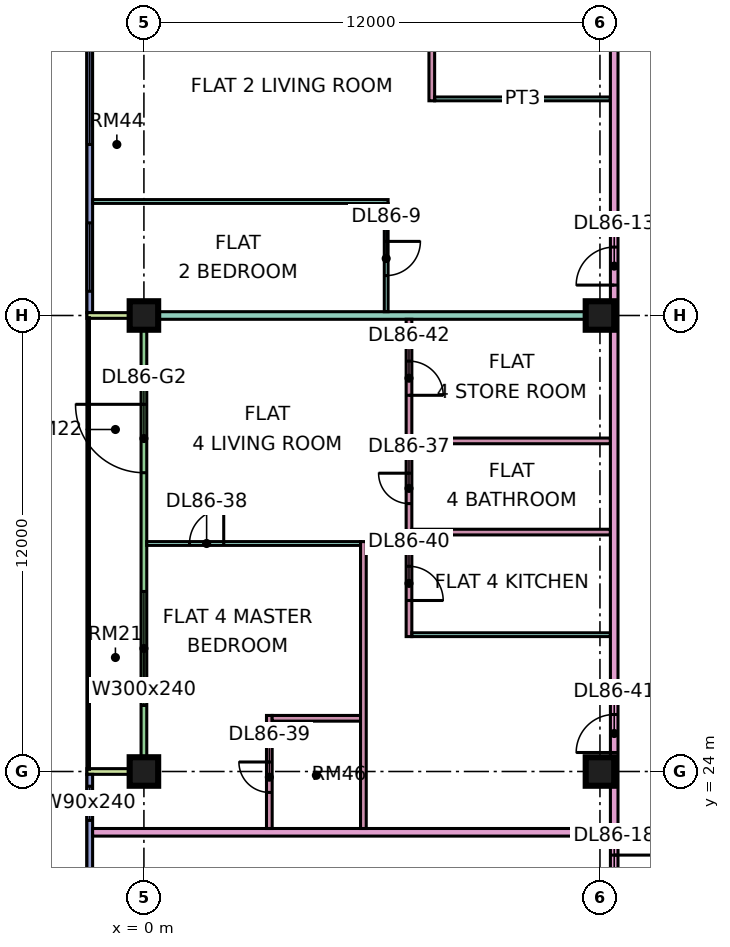
"""IFC4 building model, lengths in metres.
Left out: names, types, materials, properties, quantities, classifications, styles, units other than length and angle.
Written with IfcOpenShell. Run it as: python <this file> out.ifc"""

import sys

from ifc_helpers import new_model, si_unit, direction, frame, frame_2d, origin, origin_2d, place, context, subcontext, project, spatial, rectangle, extrude, element, fill, save


model = new_model("IFC4")
c1 = context("Model", 3, precision=1e-05, world=origin(), true_north=direction((0.0, 1.0)))
c2 = subcontext(c1, "Body", "Model", "MODEL_VIEW")
j1 = project(units=[si_unit("LENGTHUNIT", "METRE"), si_unit("PLANEANGLEUNIT", "RADIAN")], contexts=[c1])
p1 = place(None, origin())
s1 = spatial("IfcSite", under=j1, at=p1, CompositionType="ELEMENT")
p2 = place(p1, origin())
s2 = spatial("IfcBuilding", under=s1, at=p2, CompositionType="ELEMENT")
p3 = place(p2, frame((0.0, 0.0, 368.9)))
s3 = spatial("IfcBuildingStorey", under=s2, at=p3, CompositionType="ELEMENT", Elevation=368.9)
p4 = place(p3, frame((0.0, 24.0, 0.0), z_axis=(0.0, 0.0, 1.0), x_axis=(1.0, 0.0, 0.0)))
e1 = element("IfcColumn", 1, at=p4, inside=s3, PredefinedType="COLUMN", context=c2, shape_type="SweptSolid", body=[
    extrude(rectangle(XDim=0.75, YDim=0.75, at=origin_2d()), origin(), (0.0, 0.0, 1.0), 3.75),
])
p5 = place(p3, frame((0.0, 36.0, 0.0), z_axis=(0.0, 0.0, 1.0), x_axis=(1.0, 0.0, 0.0)))
e2 = element("IfcColumn", 2, at=p5, inside=s3, PredefinedType="COLUMN", context=c2, shape_type="SweptSolid", body=[
    extrude(rectangle(XDim=0.75, YDim=0.75, at=origin_2d()), origin(), (0.0, 0.0, 1.0), 3.75),
])
for number, where, z_axis, x_axis in (
    (3, (12.0, 24.0, 0.0), (0.0, 0.0, 1.0), (1.0, 0.0, 0.0)),
    (4, (12.0, 36.0, 0.0), (0.0, 0.0, 1.0), (1.0, 0.0, 0.0)),
):
    element("IfcColumn", number, at=place(p3, frame(where, z_axis=z_axis, x_axis=x_axis)), inside=s3, PredefinedType="COLUMN", context=c2, shape_type="SweptSolid", body=[
        extrude(rectangle(XDim=0.75, YDim=0.75, at=origin_2d()), origin(), (0.0, 0.0, 1.0), 3.75),
    ])
p6 = place(p3, frame((-1.425, 47.925, 0.0), z_axis=(0.0, 0.0, 1.0), x_axis=(0.0, -1.0, 0.0)))
e5 = element("IfcWall", 5, at=p6, inside=s3, PredefinedType="SOLIDWALL", context=c2, shape_type="SweptSolid", body=[
    extrude(rectangle(XDim=11.85, YDim=0.15, at=frame_2d((5.925, 0.0))), origin(), (0.0, 0.0, 1.0), 3.35),
])
p7 = place(p6, frame((0.562, 0.0, 0.45)))
e6 = element("IfcOpeningElement", 6, at=p7, cuts=e5, PredefinedType="OPENING", context=c2, shape_type="SweptSolid", body=[
    extrude(rectangle(XDim=1.8, YDim=2.4, at=frame_2d((0.9, 1.2))), frame((0.0, 0.085, 0.0), z_axis=(0.0, -1.0, 0.0), x_axis=(1.0, 0.0, 0.0)), (0.0, 0.0, 1.0), 0.17),
])
p8 = place(p6, frame((4.425, 0.0, 0.45)))
e7 = element("IfcOpeningElement", 7, at=p8, cuts=e5, PredefinedType="OPENING", context=c2, shape_type="SweptSolid", body=[
    extrude(rectangle(XDim=3.0, YDim=2.4, at=frame_2d((1.5, 1.2))), frame((0.0, 0.085, 0.0), z_axis=(0.0, -1.0, 0.0), x_axis=(1.0, 0.0, 0.0)), (0.0, 0.0, 1.0), 0.17),
])
p9 = place(p6, frame((9.488, 0.0, 0.45)))
e8 = element("IfcOpeningElement", 8, at=p9, cuts=e5, PredefinedType="OPENING", context=c2, shape_type="SweptSolid", body=[
    extrude(rectangle(XDim=1.8, YDim=2.4, at=frame_2d((0.9, 1.2))), frame((0.0, 0.085, 0.0), z_axis=(0.0, -1.0, 0.0), x_axis=(1.0, 0.0, 0.0)), (0.0, 0.0, 1.0), 0.17),
])
p10 = place(p3, frame((0.0, 35.925, 0.0), z_axis=(0.0, 0.0, 1.0), x_axis=(0.0, -1.0, 0.0)))
e9 = element("IfcWall", 9, at=p10, inside=s3, PredefinedType="SOLIDWALL", context=c2, shape_type="SweptSolid", body=[
    extrude(rectangle(XDim=11.85, YDim=0.15, at=frame_2d((5.925, 0.0))), origin(), (0.0, 0.0, 1.0), 3.35),
])
p11 = place(p10, frame((2.262, 0.0, 0.0)))
e10 = element("IfcOpeningElement", 10, at=p11, cuts=e9, PredefinedType="OPENING", context=c2, shape_type="SweptSolid", body=[
    extrude(rectangle(XDim=1.8, YDim=2.4, at=frame_2d((0.9, 1.2))), frame((0.0, 0.085, 0.0), z_axis=(0.0, -1.0, 0.0), x_axis=(1.0, 0.0, 0.0)), (0.0, 0.0, 1.0), 0.17),
])
p12 = place(p10, frame((7.188, 0.0, 0.45)))
e11 = element("IfcOpeningElement", 11, at=p12, cuts=e9, PredefinedType="OPENING", context=c2, shape_type="SweptSolid", body=[
    extrude(rectangle(XDim=3.0, YDim=2.4, at=frame_2d((1.5, 1.2))), frame((0.0, 0.085, 0.0), z_axis=(0.0, -1.0, 0.0), x_axis=(1.0, 0.0, 0.0)), (0.0, 0.0, 1.0), 0.17),
])
for number, where, z_axis, x_axis in (
    (12, (-1.5, 36.0, 0.0), (0.0, 0.0, 1.0), (1.0, 0.0, 0.0)),
    (13, (-1.5, 24.0, 0.0), (0.0, 0.0, 1.0), (1.0, 0.0, 0.0)),
):
    element("IfcWall", number, at=place(p3, frame(where, z_axis=z_axis, x_axis=x_axis)), inside=s3, PredefinedType="SOLIDWALL", context=c2, shape_type="SweptSolid", body=[
        extrude(rectangle(XDim=1.5, YDim=0.15, at=frame_2d((0.75, 0.0))), origin(), (0.0, 0.0, 1.0), 3.35),
    ])
p13 = place(p3, frame((-1.425, 23.925, 0.0), z_axis=(0.0, 0.0, 1.0), x_axis=(0.0, -1.0, 0.0)))
e14 = element("IfcWall", 14, at=p13, inside=s3, PredefinedType="SOLIDWALL", context=c2, shape_type="SweptSolid", body=[
    extrude(rectangle(XDim=11.425, YDim=0.15, at=frame_2d((5.712, 0.0))), origin(), (0.0, 0.0, 1.0), 3.35),
])
p14 = place(p13, frame((0.312, 0.0, 0.45)))
e15 = element("IfcOpeningElement", 15, at=p14, cuts=e14, PredefinedType="OPENING", context=c2, shape_type="SweptSolid", body=[
    extrude(rectangle(XDim=0.9, YDim=2.4, at=frame_2d((0.45, 1.2))), frame((0.0, 0.085, 0.0), z_axis=(0.0, -1.0, 0.0), x_axis=(1.0, 0.0, 0.0)), (0.0, 0.0, 1.0), 0.17),
])
p15 = place(p13, frame((6.175, 0.0, 0.45)))
e16 = element("IfcOpeningElement", 16, at=p15, cuts=e14, PredefinedType="OPENING", context=c2, shape_type="SweptSolid", body=[
    extrude(rectangle(XDim=3.0, YDim=2.4, at=frame_2d((1.5, 1.2))), frame((0.0, 0.085, 0.0), z_axis=(0.0, -1.0, 0.0), x_axis=(1.0, 0.0, 0.0)), (0.0, 0.0, 1.0), 0.17),
])
p16 = place(p3, frame((-1.35, 22.4, 0.0), z_axis=(0.0, 0.0, 1.0), x_axis=(1.0, 0.0, 0.0)))
e17 = element("IfcWall", 17, at=p16, inside=s3, PredefinedType="PARTITIONING", context=c2, shape_type="SweptSolid", body=[
    extrude(rectangle(XDim=13.625, YDim=0.2, at=frame_2d((6.812, 0.0))), origin(), (0.0, 0.0, 1.0), 3.35),
])
e18 = element("IfcWall", 18, at=p5, inside=s3, PredefinedType="PARTITIONING", context=c2, shape_type="SweptSolid", body=[
    extrude(rectangle(XDim=12.275, YDim=0.2, at=frame_2d((6.137, 0.0))), origin(), (0.0, 0.0, 1.0), 3.35),
])
p17 = place(p3, frame((-1.35, 39.0, 0.0), z_axis=(0.0, 0.0, 1.0), x_axis=(1.0, 0.0, 0.0)))
e19 = element("IfcWall", 19, at=p17, inside=s3, PredefinedType="PARTITIONING", context=c2, shape_type="SweptSolid", body=[
    extrude(rectangle(XDim=7.775, YDim=0.1, at=frame_2d((3.888, 0.0))), origin(), (0.0, 0.0, 1.0), 3.35),
])
p18 = place(p3, frame((0.074, 30.0, 0.0), z_axis=(0.0, 0.0, 1.0), x_axis=(1.0, 0.0, 0.0)))
e20 = element("IfcWall", 20, at=p18, inside=s3, PredefinedType="PARTITIONING", context=c2, shape_type="SweptSolid", body=[
    extrude(rectangle(XDim=5.626, YDim=0.1, at=frame_2d((2.813, 0.0))), origin(), (0.0, 0.0, 1.0), 3.35),
])
p19 = place(p18, frame((1.126, 0.0, 0.0)))
e21 = element("IfcOpeningElement", 21, at=p19, cuts=e20, PredefinedType="OPENING", context=c2, shape_type="SweptSolid", body=[
    extrude(rectangle(XDim=0.9, YDim=2.1, at=frame_2d((0.45, 1.05))), frame((0.0, 0.06, 0.0), z_axis=(0.0, -1.0, 0.0), x_axis=(1.0, 0.0, 0.0)), (0.0, 0.0, 1.0), 0.12),
])
p20 = place(p3, frame((3.3, 22.5, 0.0), z_axis=(0.0, 0.0, 1.0), x_axis=(0.0, 1.0, 0.0)))
e22 = element("IfcWall", 22, at=p20, inside=s3, PredefinedType="PARTITIONING", context=c2, shape_type="SweptSolid", body=[
    extrude(rectangle(XDim=2.975, YDim=0.15, at=frame_2d((1.488, 0.0))), origin(), (0.0, 0.0, 1.0), 3.35),
])
p21 = place(p20, frame((0.95, 0.0, 0.0)))
e23 = element("IfcOpeningElement", 23, at=p21, cuts=e22, PredefinedType="OPENING", context=c2, shape_type="SweptSolid", body=[
    extrude(rectangle(XDim=0.8, YDim=2.1, at=frame_2d((0.4, 1.05))), frame((0.0, 0.085, 0.0), z_axis=(0.0, -1.0, 0.0), x_axis=(1.0, 0.0, 0.0)), (0.0, 0.0, 1.0), 0.17),
])
p22 = place(p3, frame((3.375, 25.4, 0.0), z_axis=(0.0, 0.0, 1.0), x_axis=(1.0, 0.0, 0.0)))
e24 = element("IfcWall", 24, at=p22, inside=s3, PredefinedType="PARTITIONING", context=c2, shape_type="SweptSolid", body=[
    extrude(rectangle(XDim=2.325, YDim=0.15, at=frame_2d((1.163, 0.0))), origin(), (0.0, 0.0, 1.0), 3.35),
])
p23 = place(p3, frame((5.775, 22.5, 0.0), z_axis=(0.0, 0.0, 1.0), x_axis=(0.0, 1.0, 0.0)))
e25 = element("IfcWall", 25, at=p23, inside=s3, PredefinedType="PARTITIONING", context=c2, shape_type="SweptSolid", body=[
    extrude(rectangle(XDim=7.55, YDim=0.15, at=frame_2d((3.775, 0.0))), origin(), (0.0, 0.0, 1.0), 3.35),
])
p24 = place(p3, frame((6.375, 36.1, 0.0), z_axis=(0.0, 0.0, 1.0), x_axis=(0.0, 1.0, 0.0)))
e26 = element("IfcWall", 26, at=p24, inside=s3, PredefinedType="PARTITIONING", context=c2, shape_type="SweptSolid", body=[
    extrude(rectangle(XDim=2.85, YDim=0.1, at=frame_2d((1.425, 0.0))), origin(), (0.0, 0.0, 1.0), 3.35),
])
p25 = place(p24, frame((0.95, 0.0, 0.0)))
e27 = element("IfcOpeningElement", 27, at=p25, cuts=e26, PredefinedType="OPENING", context=c2, shape_type="SweptSolid", body=[
    extrude(rectangle(XDim=0.9, YDim=2.1, at=frame_2d((0.45, 1.05))), frame((0.0, 0.06, 0.0), z_axis=(0.0, -1.0, 0.0), x_axis=(1.0, 0.0, 0.0)), (0.0, 0.0, 1.0), 0.12),
])
p26 = place(p3, frame((6.975, 27.55, 0.0), z_axis=(0.0, 0.0, 1.0), x_axis=(0.0, 1.0, 0.0)))
e28 = element("IfcWall", 28, at=p26, inside=s3, PredefinedType="PARTITIONING", context=c2, shape_type="SweptSolid", body=[
    extrude(rectangle(XDim=8.35, YDim=0.15, at=frame_2d((4.175, 0.0))), origin(), (0.0, 0.0, 1.0), 3.35),
])
p27 = place(p26, frame((3.5, 0.0, 0.0)))
e29 = element("IfcOpeningElement", 29, at=p27, cuts=e28, PredefinedType="OPENING", context=c2, shape_type="SweptSolid", body=[
    extrude(rectangle(XDim=0.8, YDim=2.1, at=frame_2d((0.4, 1.05))), frame((0.0, 0.085, 0.0), z_axis=(0.0, -1.0, 0.0), x_axis=(1.0, 0.0, 0.0)), (0.0, 0.0, 1.0), 0.17),
])
p28 = place(p26, frame((0.95, 0.0, 0.0)))
e30 = element("IfcOpeningElement", 30, at=p28, cuts=e28, PredefinedType="OPENING", context=c2, shape_type="SweptSolid", body=[
    extrude(rectangle(XDim=0.9, YDim=2.1, at=frame_2d((0.45, 1.05))), frame((0.0, 0.085, 0.0), z_axis=(0.0, -1.0, 0.0), x_axis=(1.0, 0.0, 0.0)), (0.0, 0.0, 1.0), 0.17),
])
p29 = place(p26, frame((6.35, 0.0, 0.0)))
e31 = element("IfcOpeningElement", 31, at=p29, cuts=e28, PredefinedType="OPENING", context=c2, shape_type="SweptSolid", body=[
    extrude(rectangle(XDim=0.9, YDim=2.1, at=frame_2d((0.45, 1.05))), frame((0.0, 0.085, 0.0), z_axis=(0.0, -1.0, 0.0), x_axis=(1.0, 0.0, 0.0)), (0.0, 0.0, 1.0), 0.17),
])
p30 = place(p3, frame((7.05, 27.6, 0.0), z_axis=(0.0, 0.0, 1.0), x_axis=(1.0, 0.0, 0.0)))
e32 = element("IfcWall", 32, at=p30, inside=s3, PredefinedType="PARTITIONING", context=c2, shape_type="SweptSolid", body=[
    extrude(rectangle(XDim=5.225, YDim=0.1, at=frame_2d((2.612, 0.0))), origin(), (0.0, 0.0, 1.0), 3.35),
])
for number, where, z_axis, x_axis in (
    (33, (7.05, 30.3, 0.0), (0.0, 0.0, 1.0), (1.0, 0.0, 0.0)),
    (34, (7.05, 32.7, 0.0), (0.0, 0.0, 1.0), (1.0, 0.0, 0.0)),
):
    element("IfcWall", number, at=place(p3, frame(where, z_axis=z_axis, x_axis=x_axis)), inside=s3, PredefinedType="PARTITIONING", context=c2, shape_type="SweptSolid", body=[
        extrude(rectangle(XDim=5.225, YDim=0.15, at=frame_2d((2.612, 0.0))), origin(), (0.0, 0.0, 1.0), 3.35),
    ])
p31 = place(p3, frame((7.575, 41.65, 0.0), z_axis=(0.0, 0.0, 1.0), x_axis=(0.0, 1.0, 0.0)))
e35 = element("IfcWall", 35, at=p31, inside=s3, PredefinedType="PARTITIONING", context=c2, shape_type="SweptSolid", body=[
    extrude(rectangle(XDim=12.276, YDim=0.15, at=frame_2d((6.138, 0.0))), origin(), (0.0, 0.0, 1.0), 3.35),
])
p32 = place(p31, frame((8.0, 0.0, 0.0)))
e36 = element("IfcOpeningElement", 36, at=p32, cuts=e35, PredefinedType="OPENING", context=c2, shape_type="SweptSolid", body=[
    extrude(rectangle(XDim=0.8, YDim=2.1, at=frame_2d((0.4, 1.05))), frame((0.0, 0.085, 0.0), z_axis=(0.0, -1.0, 0.0), x_axis=(1.0, 0.0, 0.0)), (0.0, 0.0, 1.0), 0.17),
])
p33 = place(p31, frame((3.05, 0.0, 0.0)))
e37 = element("IfcOpeningElement", 37, at=p33, cuts=e35, PredefinedType="OPENING", context=c2, shape_type="SweptSolid", body=[
    extrude(rectangle(XDim=0.9, YDim=2.1, at=frame_2d((0.45, 1.05))), frame((0.0, 0.085, 0.0), z_axis=(0.0, -1.0, 0.0), x_axis=(1.0, 0.0, 0.0)), (0.0, 0.0, 1.0), 0.17),
])
p34 = place(p31, frame((10.7, 0.0, 0.0)))
e38 = element("IfcOpeningElement", 38, at=p34, cuts=e35, PredefinedType="OPENING", context=c2, shape_type="SweptSolid", body=[
    extrude(rectangle(XDim=0.9, YDim=2.1, at=frame_2d((0.45, 1.05))), frame((0.0, 0.085, 0.0), z_axis=(0.0, -1.0, 0.0), x_axis=(1.0, 0.0, 0.0)), (0.0, 0.0, 1.0), 0.17),
])
p35 = place(p3, frame((7.65, 41.7, 0.0), z_axis=(0.0, 0.0, 1.0), x_axis=(1.0, 0.0, 0.0)))
e39 = element("IfcWall", 39, at=p35, inside=s3, PredefinedType="PARTITIONING", context=c2, shape_type="SweptSolid", body=[
    extrude(rectangle(XDim=4.625, YDim=0.1, at=frame_2d((2.312, 0.0))), origin(), (0.0, 0.0, 1.0), 3.35),
])
p36 = place(p3, frame((12.375, 20.0, 0.0), z_axis=(0.0, 0.0, 1.0), x_axis=(0.0, 1.0, 0.0)))
e40 = element("IfcWall", 40, at=p36, inside=s3, PredefinedType="PARTITIONING", context=c2, shape_type="SweptSolid", body=[
    extrude(rectangle(XDim=34.0, YDim=0.2, at=frame_2d((17.0, 0.0))), origin(), (0.0, 0.0, 1.0), 3.35),
])
p37 = place(p36, frame((16.8, 0.0, 0.0)))
e41 = element("IfcOpeningElement", 41, at=p37, cuts=e40, PredefinedType="OPENING", context=c2, shape_type="SweptSolid", body=[
    extrude(rectangle(XDim=1.0, YDim=2.1, at=frame_2d((0.5, 1.05))), frame((0.0, 0.11, 0.0), z_axis=(0.0, -1.0, 0.0), x_axis=(1.0, 0.0, 0.0)), (0.0, 0.0, 1.0), 0.22),
])
p38 = place(p36, frame((0.6, 0.0, 0.0)))
e42 = element("IfcOpeningElement", 42, at=p38, cuts=e40, PredefinedType="OPENING", context=c2, shape_type="SweptSolid", body=[
    extrude(rectangle(XDim=1.2, YDim=2.1, at=frame_2d((0.6, 1.05))), frame((0.0, 0.11, 0.0), z_axis=(0.0, -1.0, 0.0), x_axis=(1.0, 0.0, 0.0)), (0.0, 0.0, 1.0), 0.22),
])
p39 = place(p36, frame((4.5, 0.0, 0.0)))
e43 = element("IfcOpeningElement", 43, at=p39, cuts=e40, PredefinedType="OPENING", context=c2, shape_type="SweptSolid", body=[
    extrude(rectangle(XDim=1.0, YDim=2.1, at=frame_2d((0.5, 1.05))), frame((0.0, 0.11, 0.0), z_axis=(0.0, -1.0, 0.0), x_axis=(1.0, 0.0, 0.0)), (0.0, 0.0, 1.0), 0.22),
])
p40 = place(p8, origin())
e44 = element("IfcWindow", 44, at=p40, inside=s3, PartitioningType="SINGLE_PANEL", PredefinedType="WINDOW", context=c2, shape_type="SweptSolid", body=[
    extrude(rectangle(XDim=3.0, YDim=2.4, at=frame_2d((1.5, 1.2))), frame((0.0, 0.03, 0.0), z_axis=(0.0, -1.0, 0.0), x_axis=(1.0, 0.0, 0.0)), (0.0, 0.0, 1.0), 0.06),
])
fill(e7, e44)
p41 = place(p9, origin())
e45 = element("IfcWindow", 45, at=p41, inside=s3, PartitioningType="SINGLE_PANEL", PredefinedType="WINDOW", context=c2, shape_type="SweptSolid", body=[
    extrude(rectangle(XDim=1.8, YDim=2.4, at=frame_2d((0.9, 1.2))), frame((0.0, 0.03, 0.0), z_axis=(0.0, -1.0, 0.0), x_axis=(1.0, 0.0, 0.0)), (0.0, 0.0, 1.0), 0.06),
])
fill(e8, e45)
p42 = place(p11, frame((1.8, 0.0, 0.0), z_axis=(0.0, 0.0, 1.0), x_axis=(-1.0, 0.0, 0.0)))
e46 = element("IfcDoor", 46, at=p42, inside=s3, OperationType="DOUBLE_DOOR_SINGLE_SWING", PredefinedType="DOOR", context=c2, shape_type="SweptSolid", body=[
    extrude(rectangle(XDim=1.8, YDim=2.4, at=frame_2d((0.9, 1.2))), frame((0.0, 0.025, 0.0), z_axis=(0.0, -1.0, 0.0), x_axis=(1.0, 0.0, 0.0)), (0.0, 0.0, 1.0), 0.05),
])
fill(e10, e46)
p43 = place(p12, origin())
e47 = element("IfcWindow", 47, at=p43, inside=s3, PartitioningType="SINGLE_PANEL", PredefinedType="WINDOW", context=c2, shape_type="SweptSolid", body=[
    extrude(rectangle(XDim=3.0, YDim=2.4, at=frame_2d((1.5, 1.2))), frame((0.0, 0.03, 0.0), z_axis=(0.0, -1.0, 0.0), x_axis=(1.0, 0.0, 0.0)), (0.0, 0.0, 1.0), 0.06),
])
fill(e11, e47)
p44 = place(p14, origin())
e48 = element("IfcWindow", 48, at=p44, inside=s3, PartitioningType="SINGLE_PANEL", PredefinedType="WINDOW", context=c2, shape_type="SweptSolid", body=[
    extrude(rectangle(XDim=0.9, YDim=2.4, at=frame_2d((0.45, 1.2))), frame((0.0, 0.03, 0.0), z_axis=(0.0, -1.0, 0.0), x_axis=(1.0, 0.0, 0.0)), (0.0, 0.0, 1.0), 0.06),
])
fill(e15, e48)
p45 = place(p25, origin())
e49 = element("IfcDoor", 49, at=p45, inside=s3, OperationType="SINGLE_SWING_RIGHT", PredefinedType="DOOR", context=c2, shape_type="SweptSolid", body=[
    extrude(rectangle(XDim=0.9, YDim=2.1, at=frame_2d((0.45, 1.05))), frame((0.0, 0.025, 0.0), z_axis=(0.0, -1.0, 0.0), x_axis=(1.0, 0.0, 0.0)), (0.0, 0.0, 1.0), 0.05),
])
fill(e27, e49)
p46 = place(p37, origin())
e50 = element("IfcDoor", 50, at=p46, inside=s3, OperationType="SINGLE_SWING_LEFT", PredefinedType="DOOR", context=c2, shape_type="SweptSolid", body=[
    extrude(rectangle(XDim=1.0, YDim=2.1, at=frame_2d((0.5, 1.05))), frame((0.0, 0.025, 0.0), z_axis=(0.0, -1.0, 0.0), x_axis=(1.0, 0.0, 0.0)), (0.0, 0.0, 1.0), 0.05),
])
fill(e41, e50)
p47 = place(p38, origin())
e51 = element("IfcDoor", 51, at=p47, inside=s3, OperationType="SINGLE_SWING_RIGHT", PredefinedType="DOOR", context=c2, shape_type="SweptSolid", body=[
    extrude(rectangle(XDim=1.2, YDim=2.1, at=frame_2d((0.6, 1.05))), frame((0.0, 0.025, 0.0), z_axis=(0.0, -1.0, 0.0), x_axis=(1.0, 0.0, 0.0)), (0.0, 0.0, 1.0), 0.05),
])
fill(e42, e51)
p48 = place(p27, frame((0.8, 0.0, 0.0), z_axis=(0.0, 0.0, 1.0), x_axis=(-1.0, 0.0, 0.0)))
e52 = element("IfcDoor", 52, at=p48, inside=s3, OperationType="SINGLE_SWING_RIGHT", PredefinedType="DOOR", context=c2, shape_type="SweptSolid", body=[
    extrude(rectangle(XDim=0.8, YDim=2.1, at=frame_2d((0.4, 1.05))), frame((0.0, 0.025, 0.0), z_axis=(0.0, -1.0, 0.0), x_axis=(1.0, 0.0, 0.0)), (0.0, 0.0, 1.0), 0.05),
])
fill(e29, e52)
p49 = place(p19, frame((0.9, 0.0, 0.0), z_axis=(0.0, 0.0, 1.0), x_axis=(-1.0, 0.0, 0.0)))
e53 = element("IfcDoor", 53, at=p49, inside=s3, OperationType="SINGLE_SWING_RIGHT", PredefinedType="DOOR", context=c2, shape_type="SweptSolid", body=[
    extrude(rectangle(XDim=0.9, YDim=2.1, at=frame_2d((0.45, 1.05))), frame((0.0, 0.025, 0.0), z_axis=(0.0, -1.0, 0.0), x_axis=(1.0, 0.0, 0.0)), (0.0, 0.0, 1.0), 0.05),
])
fill(e21, e53)
p50 = place(p21, frame((0.8, 0.0, 0.0), z_axis=(0.0, 0.0, 1.0), x_axis=(-1.0, 0.0, 0.0)))
e54 = element("IfcDoor", 54, at=p50, inside=s3, OperationType="SINGLE_SWING_RIGHT", PredefinedType="DOOR", context=c2, shape_type="SweptSolid", body=[
    extrude(rectangle(XDim=0.8, YDim=2.1, at=frame_2d((0.4, 1.05))), frame((0.0, 0.025, 0.0), z_axis=(0.0, -1.0, 0.0), x_axis=(1.0, 0.0, 0.0)), (0.0, 0.0, 1.0), 0.05),
])
fill(e23, e54)
p51 = place(p28, frame((0.9, 0.0, 0.0), z_axis=(0.0, 0.0, 1.0), x_axis=(-1.0, 0.0, 0.0)))
e55 = element("IfcDoor", 55, at=p51, inside=s3, OperationType="SINGLE_SWING_LEFT", PredefinedType="DOOR", context=c2, shape_type="SweptSolid", body=[
    extrude(rectangle(XDim=0.9, YDim=2.1, at=frame_2d((0.45, 1.05))), frame((0.0, 0.025, 0.0), z_axis=(0.0, -1.0, 0.0), x_axis=(1.0, 0.0, 0.0)), (0.0, 0.0, 1.0), 0.05),
])
fill(e30, e55)
p52 = place(p39, origin())
e56 = element("IfcDoor", 56, at=p52, inside=s3, OperationType="SINGLE_SWING_LEFT", PredefinedType="DOOR", context=c2, shape_type="SweptSolid", body=[
    extrude(rectangle(XDim=1.0, YDim=2.1, at=frame_2d((0.5, 1.05))), frame((0.0, 0.025, 0.0), z_axis=(0.0, -1.0, 0.0), x_axis=(1.0, 0.0, 0.0)), (0.0, 0.0, 1.0), 0.05),
])
fill(e43, e56)
p53 = place(p29, frame((0.9, 0.0, 0.0), z_axis=(0.0, 0.0, 1.0), x_axis=(-1.0, 0.0, 0.0)))
e57 = element("IfcDoor", 57, at=p53, inside=s3, OperationType="SINGLE_SWING_LEFT", PredefinedType="DOOR", context=c2, shape_type="SweptSolid", body=[
    extrude(rectangle(XDim=0.9, YDim=2.1, at=frame_2d((0.45, 1.05))), frame((0.0, 0.025, 0.0), z_axis=(0.0, -1.0, 0.0), x_axis=(1.0, 0.0, 0.0)), (0.0, 0.0, 1.0), 0.05),
])
fill(e31, e57)
save(model, sys.argv[1])
